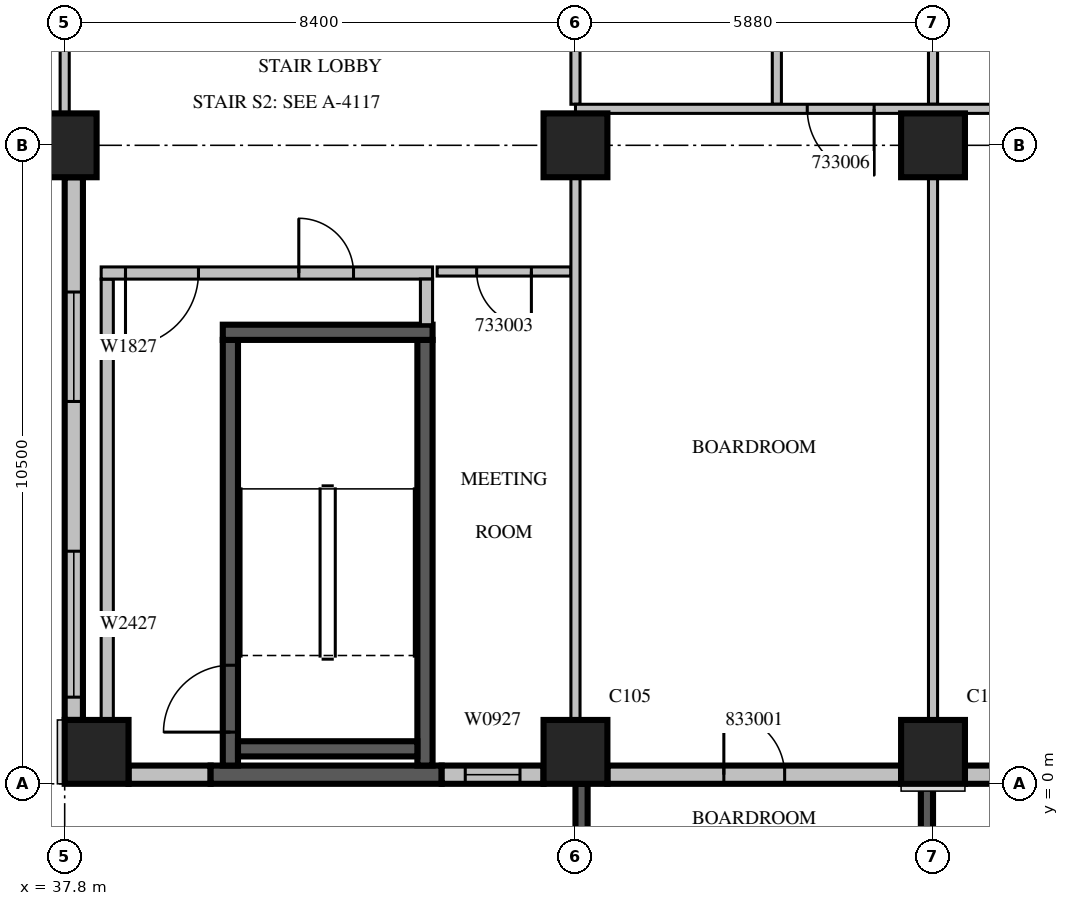
"""IFC4 building model, lengths in metres.
Left out: names, types, materials, properties, quantities, classifications, styles, units other than length and angle.
Written with IfcOpenShell. Run it as: python <this file> out.ifc"""

import sys

from ifc_helpers import new_model, si_unit, direction, frame, frame_2d, origin, origin_2d, place, context, subcontext, project, spatial, rectangle, extrude, source, transform, mapped, element, fill, save


model = new_model("IFC4")
c1 = context("Model", 3, precision=1e-05, world=origin(), true_north=direction((0.0, 1.0)))
c2 = subcontext(c1, "Body", "Model", "MODEL_VIEW")
j1 = project(units=[si_unit("LENGTHUNIT", "METRE"), si_unit("PLANEANGLEUNIT", "RADIAN")], contexts=[c1])
p1 = place(None, origin())
s1 = spatial("IfcSite", under=j1, at=p1, CompositionType="ELEMENT")
p2 = place(p1, origin())
s2 = spatial("IfcBuilding", under=s1, at=p2, CompositionType="ELEMENT")
p3 = place(p2, frame((0.0, 0.0, 149.7)))
s3 = spatial("IfcBuildingStorey", under=s2, at=p3, CompositionType="ELEMENT", Elevation=149.7)
m1 = source(origin(), c2, "Body", "SweptSolid", [
    extrude(rectangle(XDim=1.05, YDim=1.05, at=origin_2d()), origin(), (0.0, 0.0, 1.0), 4.2),
])
for number, where, z_axis, x_axis in (
    (1, (38.325, 0.525, 0.0), (0.0, 0.0, 1.0), (1.0, 0.0, 0.0)),
    (2, (46.2, 0.525, 0.0), (0.0, 0.0, 1.0), (1.0, 0.0, 0.0)),
    (3, (52.08, 0.525, 0.0), (0.0, 0.0, 1.0), (1.0, 0.0, 0.0)),
    (4, (37.8, 10.5, 0.0), (0.0, 0.0, 1.0), (1.0, 0.0, 0.0)),
    (5, (46.2, 10.5, 0.0), (0.0, 0.0, 1.0), (1.0, 0.0, 0.0)),
    (6, (52.08, 10.5, 0.0), (0.0, 0.0, 1.0), (1.0, 0.0, 0.0)),
):
    element("IfcColumn", number, at=place(p3, frame(where, z_axis=z_axis, x_axis=x_axis)), inside=s3, PredefinedType="COLUMN", context=c2, shape_type="MappedRepresentation", body=[
        mapped(m1, transform((0.0, 0.0, 0.0), scale=1.0)),
    ])
m2 = source(origin(), c2, "Body", "SweptSolid", [
    extrude(rectangle(XDim=3.9, YDim=0.2, at=frame_2d((1.95, 0.0))), origin(), (0.0, 0.0, 1.0), 3.8),
])
p4 = place(p3, frame((46.3, 0.0, 0.0), z_axis=(0.0, 0.0, 1.0), x_axis=(0.0, -1.0, 0.0)))
e7 = element("IfcWall", 7, at=p4, inside=s3, PredefinedType="SOLIDWALL", context=c2, shape_type="MappedRepresentation", body=[
    mapped(m2, transform((0.0, 0.0, 0.0), scale=1.0)),
])
m3 = source(origin(), c2, "Body", "SweptSolid", [
    extrude(rectangle(XDim=2.4, YDim=2.7, at=frame_2d((1.2, 1.35))), frame((0.0, 0.11, 0.0), z_axis=(0.0, -1.0, 0.0), x_axis=(1.0, 0.0, 0.0)), (0.0, 0.0, 1.0), 0.22),
])
p5 = place(p4, frame((0.75, 0.0, 0.6)))
e8 = element("IfcOpeningElement", 8, at=p5, cuts=e7, PredefinedType="OPENING", context=c2, shape_type="MappedRepresentation", body=[
    mapped(m3, transform((0.0, 0.0, 0.0), scale=1.0)),
])
p6 = place(p3, frame((51.98, 0.0, 0.0), z_axis=(0.0, 0.0, 1.0), x_axis=(0.0, -1.0, 0.0)))
e9 = element("IfcWall", 9, at=p6, inside=s3, PredefinedType="SOLIDWALL", context=c2, shape_type="MappedRepresentation", body=[
    mapped(m2, transform((0.0, 0.0, 0.0), scale=1.0)),
])
p7 = place(p6, frame((0.75, 0.0, 0.6)))
e10 = element("IfcOpeningElement", 10, at=p7, cuts=e9, PredefinedType="OPENING", context=c2, shape_type="MappedRepresentation", body=[
    mapped(m3, transform((0.0, 0.0, 0.0), scale=1.0)),
])
m4 = source(origin(), c2, "Body", "SweptSolid", [
    extrude(rectangle(XDim=8.925, YDim=0.3, at=frame_2d((4.463, 0.0))), origin(), (0.0, 0.0, 1.0), 3.8),
])
p8 = place(p3, frame((37.95, 9.975, 0.0), z_axis=(0.0, 0.0, 1.0), x_axis=(0.0, -1.0, 0.0)))
e11 = element("IfcWall", 11, at=p8, inside=s3, PredefinedType="STANDARD", context=c2, shape_type="MappedRepresentation", body=[
    mapped(m4, transform((0.0, 0.0, 0.0), scale=1.0)),
])
m5 = source(origin(), c2, "Body", "SweptSolid", [
    extrude(rectangle(XDim=1.8, YDim=2.7, at=frame_2d((0.9, 1.35))), frame((0.0, 0.16, 0.0), z_axis=(0.0, -1.0, 0.0), x_axis=(1.0, 0.0, 0.0)), (0.0, 0.0, 1.0), 0.32),
])
p9 = place(p8, frame((1.887, 0.0, 0.6)))
e12 = element("IfcOpeningElement", 12, at=p9, cuts=e11, PredefinedType="OPENING", context=c2, shape_type="MappedRepresentation", body=[
    mapped(m5, transform((0.0, 0.0, 0.0), scale=1.0)),
])
m6 = source(origin(), c2, "Body", "SweptSolid", [
    extrude(rectangle(XDim=2.4, YDim=2.7, at=frame_2d((1.2, 1.35))), frame((0.0, 0.16, 0.0), z_axis=(0.0, -1.0, 0.0), x_axis=(1.0, 0.0, 0.0)), (0.0, 0.0, 1.0), 0.32),
])
p10 = place(p8, frame((6.15, 0.0, 0.6)))
e13 = element("IfcOpeningElement", 13, at=p10, cuts=e11, PredefinedType="OPENING", context=c2, shape_type="MappedRepresentation", body=[
    mapped(m6, transform((0.0, 0.0, 0.0), scale=1.0)),
])
m7 = source(origin(), c2, "Body", "SweptSolid", [
    extrude(rectangle(XDim=1.35, YDim=0.3, at=frame_2d((0.675, 0.0))), origin(), (0.0, 0.0, 1.0), 3.8),
])
p11 = place(p3, frame((38.85, 0.15, 0.0), z_axis=(0.0, 0.0, 1.0), x_axis=(1.0, 0.0, 0.0)))
e14 = element("IfcWall", 14, at=p11, inside=s3, PredefinedType="STANDARD", context=c2, shape_type="MappedRepresentation", body=[
    mapped(m7, transform((0.0, 0.0, 0.0), scale=1.0)),
])
m8 = source(origin(), c2, "Body", "SweptSolid", [
    extrude(rectangle(XDim=3.8, YDim=0.3, at=frame_2d((1.9, 0.0))), origin(), (0.0, 0.0, 1.0), 3.8),
])
p12 = place(p3, frame((40.2, 0.15, 0.0), z_axis=(0.0, 0.0, 1.0), x_axis=(1.0, 0.0, 0.0)))
e15 = element("IfcWall", 15, at=p12, inside=s3, PredefinedType="SOLIDWALL", context=c2, shape_type="MappedRepresentation", body=[
    mapped(m8, transform((0.0, 0.0, 0.0), scale=1.0)),
])
m9 = source(origin(), c2, "Body", "SweptSolid", [
    extrude(rectangle(XDim=1.675, YDim=0.3, at=frame_2d((0.838, 0.0))), origin(), (0.0, 0.0, 1.0), 3.8),
])
p13 = place(p3, frame((44.0, 0.15, 0.0), z_axis=(0.0, 0.0, 1.0), x_axis=(1.0, 0.0, 0.0)))
e16 = element("IfcWall", 16, at=p13, inside=s3, PredefinedType="STANDARD", context=c2, shape_type="MappedRepresentation", body=[
    mapped(m9, transform((0.0, 0.0, 0.0), scale=1.0)),
])
m10 = source(origin(), c2, "Body", "SweptSolid", [
    extrude(rectangle(XDim=0.9, YDim=2.7, at=frame_2d((0.45, 1.35))), frame((0.0, 0.16, 0.0), z_axis=(0.0, -1.0, 0.0), x_axis=(1.0, 0.0, 0.0)), (0.0, 0.0, 1.0), 0.32),
])
p14 = place(p13, frame((0.388, 0.0, 0.6)))
e17 = element("IfcOpeningElement", 17, at=p14, cuts=e16, PredefinedType="OPENING", context=c2, shape_type="MappedRepresentation", body=[
    mapped(m10, transform((0.0, 0.0, 0.0), scale=1.0)),
])
m11 = source(origin(), c2, "Body", "SweptSolid", [
    extrude(rectangle(XDim=4.83, YDim=0.3, at=frame_2d((2.415, 0.0))), origin(), (0.0, 0.0, 1.0), 3.8),
])
p15 = place(p3, frame((46.725, 0.15, 0.0), z_axis=(0.0, 0.0, 1.0), x_axis=(1.0, 0.0, 0.0)))
e18 = element("IfcWall", 18, at=p15, inside=s3, PredefinedType="STANDARD", context=c2, shape_type="MappedRepresentation", body=[
    mapped(m11, transform((0.0, 0.0, 0.0), scale=1.0)),
])
m12 = source(origin(), c2, "Body", "SweptSolid", [
    extrude(rectangle(XDim=1.0, YDim=2.1, at=frame_2d((0.5, 1.05))), frame((0.0, 0.16, 0.0), z_axis=(0.0, -1.0, 0.0), x_axis=(1.0, 0.0, 0.0)), (0.0, 0.0, 1.0), 0.32),
])
p16 = place(p15, frame((1.915, 0.0, 0.0)))
e19 = element("IfcOpeningElement", 19, at=p16, cuts=e18, PredefinedType="OPENING", context=c2, shape_type="MappedRepresentation", body=[
    mapped(m12, transform((0.0, 0.0, 0.0), scale=1.0)),
])
p17 = place(p3, frame((52.605, 0.15, 0.0), z_axis=(0.0, 0.0, 1.0), x_axis=(1.0, 0.0, 0.0)))
e20 = element("IfcWall", 20, at=p17, inside=s3, PredefinedType="STANDARD", context=c2, shape_type="MappedRepresentation", body=[
    mapped(m11, transform((0.0, 0.0, 0.0), scale=1.0)),
])
m13 = source(origin(), c2, "Body", "SweptSolid", [
    extrude(rectangle(XDim=3.6, YDim=2.7, at=frame_2d((1.8, 1.35))), frame((0.0, 0.16, 0.0), z_axis=(0.0, -1.0, 0.0), x_axis=(1.0, 0.0, 0.0)), (0.0, 0.0, 1.0), 0.32),
])
p18 = place(p17, frame((0.615, 0.0, 0.6)))
e21 = element("IfcOpeningElement", 21, at=p18, cuts=e20, PredefinedType="OPENING", context=c2, shape_type="MappedRepresentation", body=[
    mapped(m13, transform((0.0, 0.0, 0.0), scale=1.0)),
])
m14 = source(origin(), c2, "Body", "SweptSolid", [
    extrude(rectangle(XDim=7.0, YDim=0.25, at=frame_2d((3.5, 0.0))), origin(), (0.0, 0.0, 1.0), 3.8),
])
p19 = place(p3, frame((40.525, 0.3, 0.0), z_axis=(0.0, 0.0, 1.0), x_axis=(0.0, 1.0, 0.0)))
e22 = element("IfcWall", 22, at=p19, inside=s3, PredefinedType="SOLIDWALL", context=c2, shape_type="MappedRepresentation", body=[
    mapped(m14, transform((0.0, 0.0, 0.0), scale=1.0)),
])
m15 = source(origin(), c2, "Body", "SweptSolid", [
    extrude(rectangle(XDim=1.1, YDim=2.1, at=frame_2d((0.55, 1.05))), frame((0.0, 0.135, 0.0), z_axis=(0.0, -1.0, 0.0), x_axis=(1.0, 0.0, 0.0)), (0.0, 0.0, 1.0), 0.27),
])
p20 = place(p19, frame((0.55, 0.0, 0.0)))
e23 = element("IfcOpeningElement", 23, at=p20, cuts=e22, PredefinedType="OPENING", context=c2, shape_type="MappedRepresentation", body=[
    mapped(m15, transform((0.0, 0.0, 0.0), scale=1.0)),
])
p21 = place(p3, frame((43.725, 0.3, 0.0), z_axis=(0.0, 0.0, 1.0), x_axis=(0.0, 1.0, 0.0)))
e24 = element("IfcWall", 24, at=p21, inside=s3, PredefinedType="SOLIDWALL", context=c2, shape_type="MappedRepresentation", body=[
    mapped(m14, transform((0.0, 0.0, 0.0), scale=1.0)),
])
m16 = source(origin(), c2, "Body", "SweptSolid", [
    extrude(rectangle(XDim=3.45, YDim=0.25, at=frame_2d((1.725, 0.0))), origin(), (0.0, 0.0, 1.0), 3.8),
])
p22 = place(p3, frame((40.4, 7.425, 0.0), z_axis=(0.0, 0.0, 1.0), x_axis=(1.0, 0.0, 0.0)))
e25 = element("IfcWall", 25, at=p22, inside=s3, PredefinedType="SOLIDWALL", context=c2, shape_type="MappedRepresentation", body=[
    mapped(m16, transform((0.0, 0.0, 0.0), scale=1.0)),
])
m17 = source(origin(), c2, "Body", "SweptSolid", [
    extrude(rectangle(XDim=2.95, YDim=0.25, at=frame_2d((1.475, 0.0))), origin(), (0.0, 0.0, 1.0), 3.8),
])
p23 = place(p3, frame((40.65, 0.575, 0.0), z_axis=(0.0, 0.0, 1.0), x_axis=(1.0, 0.0, 0.0)))
e26 = element("IfcWall", 26, at=p23, inside=s3, PredefinedType="SOLIDWALL", context=c2, shape_type="MappedRepresentation", body=[
    mapped(m17, transform((0.0, 0.0, 0.0), scale=1.0)),
])
m18 = source(origin(), c2, "Body", "SweptSolid", [
    extrude(rectangle(XDim=8.0, YDim=0.2, at=frame_2d((4.0, 0.0))), origin(), (0.0, 0.0, 1.0), 3.8),
])
p24 = place(p3, frame((38.5, 0.3, 0.0), z_axis=(0.0, 0.0, 1.0), x_axis=(0.0, 1.0, 0.0)))
e27 = element("IfcWall", 27, at=p24, inside=s3, PredefinedType="PARTITIONING", context=c2, shape_type="MappedRepresentation", body=[
    mapped(m18, transform((0.0, 0.0, 0.0), scale=1.0)),
])
m19 = source(origin(), c2, "Body", "SweptSolid", [
    extrude(rectangle(XDim=5.45, YDim=0.2, at=frame_2d((2.725, 0.0))), origin(), (0.0, 0.0, 1.0), 3.8),
])
p25 = place(p3, frame((38.4, 8.4, 0.0), z_axis=(0.0, 0.0, 1.0), x_axis=(1.0, 0.0, 0.0)))
e28 = element("IfcWall", 28, at=p25, inside=s3, PredefinedType="PARTITIONING", context=c2, shape_type="MappedRepresentation", body=[
    mapped(m19, transform((0.0, 0.0, 0.0), scale=1.0)),
])
m20 = source(origin(), c2, "Body", "SweptSolid", [
    extrude(rectangle(XDim=1.2, YDim=2.1, at=frame_2d((0.6, 1.05))), frame((0.0, 0.11, 0.0), z_axis=(0.0, -1.0, 0.0), x_axis=(1.0, 0.0, 0.0)), (0.0, 0.0, 1.0), 0.22),
])
p26 = place(p25, frame((0.4, 0.0, 0.0)))
e29 = element("IfcOpeningElement", 29, at=p26, cuts=e28, PredefinedType="OPENING", context=c2, shape_type="MappedRepresentation", body=[
    mapped(m20, transform((0.0, 0.0, 0.0), scale=1.0)),
])
m21 = source(origin(), c2, "Body", "SweptSolid", [
    extrude(rectangle(XDim=0.9, YDim=2.1, at=frame_2d((0.45, 1.05))), frame((0.0, 0.11, 0.0), z_axis=(0.0, -1.0, 0.0), x_axis=(1.0, 0.0, 0.0)), (0.0, 0.0, 1.0), 0.22),
])
p27 = place(p25, frame((3.25, 0.0, 0.0)))
e30 = element("IfcOpeningElement", 30, at=p27, cuts=e28, PredefinedType="OPENING", context=c2, shape_type="MappedRepresentation", body=[
    mapped(m21, transform((0.0, 0.0, 0.0), scale=1.0)),
])
m22 = source(origin(), c2, "Body", "SweptSolid", [
    extrude(rectangle(XDim=0.75, YDim=0.2, at=frame_2d((0.375, 0.0))), origin(), (0.0, 0.0, 1.0), 3.8),
])
p28 = place(p3, frame((43.75, 7.55, 0.0), z_axis=(0.0, 0.0, 1.0), x_axis=(0.0, 1.0, 0.0)))
e31 = element("IfcWall", 31, at=p28, inside=s3, PredefinedType="PARTITIONING", context=c2, shape_type="MappedRepresentation", body=[
    mapped(m22, transform((0.0, 0.0, 0.0), scale=1.0)),
])
m23 = source(origin(), c2, "Body", "SweptSolid", [
    extrude(rectangle(XDim=2.2, YDim=0.15, at=frame_2d((1.1, 0.0))), origin(), (0.0, 0.0, 1.0), 3.8),
])
p29 = place(p3, frame((46.125, 8.425, 0.0), z_axis=(0.0, 0.0, 1.0), x_axis=(-1.0, 0.0, 0.0)))
e32 = element("IfcWall", 32, at=p29, inside=s3, PredefinedType="PARTITIONING", context=c2, shape_type="MappedRepresentation", body=[
    mapped(m23, transform((0.0, 0.0, 0.0), scale=1.0)),
])
m24 = source(origin(), c2, "Body", "SweptSolid", [
    extrude(rectangle(XDim=0.9, YDim=2.1, at=frame_2d((0.45, 1.05))), frame((0.0, 0.085, 0.0), z_axis=(0.0, -1.0, 0.0), x_axis=(1.0, 0.0, 0.0)), (0.0, 0.0, 1.0), 0.17),
])
p30 = place(p29, frame((0.65, 0.0, 0.0)))
e33 = element("IfcOpeningElement", 33, at=p30, cuts=e32, PredefinedType="OPENING", context=c2, shape_type="MappedRepresentation", body=[
    mapped(m24, transform((0.0, 0.0, 0.0), scale=1.0)),
])
m25 = source(origin(), c2, "Body", "SweptSolid", [
    extrude(rectangle(XDim=3.976, YDim=0.15, at=frame_2d((1.988, 0.0))), origin(), (0.0, 0.0, 1.0), 3.8),
])
p31 = place(p3, frame((37.8, 11.024, 0.0), z_axis=(0.0, 0.0, 1.0), x_axis=(0.0, 1.0, 0.0)))
e34 = element("IfcWall", 34, at=p31, inside=s3, PredefinedType="PARTITIONING", context=c2, shape_type="MappedRepresentation", body=[
    mapped(m25, transform((0.0, 0.0, 0.0), scale=1.0)),
])
m26 = source(origin(), c2, "Body", "SweptSolid", [
    extrude(rectangle(XDim=3.825, YDim=0.15, at=frame_2d((1.913, 0.0))), origin(), (0.0, 0.0, 1.0), 3.8),
])
p32 = place(p3, frame((49.512, 11.175, 0.0), z_axis=(0.0, 0.0, 1.0), x_axis=(0.0, 1.0, 0.0)))
e35 = element("IfcWall", 35, at=p32, inside=s3, PredefinedType="PARTITIONING", context=c2, shape_type="MappedRepresentation", body=[
    mapped(m26, transform((0.0, 0.0, 0.0), scale=1.0)),
])
m27 = source(origin(), c2, "Body", "SweptSolid", [
    extrude(rectangle(XDim=8.927, YDim=0.15, at=frame_2d((4.463, 0.0))), origin(), (0.0, 0.0, 1.0), 3.8),
])
p33 = place(p3, frame((46.2, 1.049, 0.0), z_axis=(0.0, 0.0, 1.0), x_axis=(0.0, 1.0, 0.0)))
e36 = element("IfcWall", 36, at=p33, inside=s3, PredefinedType="PARTITIONING", context=c2, shape_type="MappedRepresentation", body=[
    mapped(m27, transform((0.0, 0.0, 0.0), scale=1.0)),
])
p34 = place(p3, frame((46.2, 11.175, 0.0), z_axis=(0.0, 0.0, 1.0), x_axis=(0.0, 1.0, 0.0)))
e37 = element("IfcWall", 37, at=p34, inside=s3, PredefinedType="PARTITIONING", context=c2, shape_type="MappedRepresentation", body=[
    mapped(m26, transform((0.0, 0.0, 0.0), scale=1.0)),
])
p35 = place(p3, frame((52.08, 1.049, 0.0), z_axis=(0.0, 0.0, 1.0), x_axis=(0.0, 1.0, 0.0)))
e38 = element("IfcWall", 38, at=p35, inside=s3, PredefinedType="PARTITIONING", context=c2, shape_type="MappedRepresentation", body=[
    mapped(m27, transform((0.0, 0.0, 0.0), scale=1.0)),
])
p36 = place(p3, frame((52.08, 11.175, 0.0), z_axis=(0.0, 0.0, 1.0), x_axis=(0.0, 1.0, 0.0)))
e39 = element("IfcWall", 39, at=p36, inside=s3, PredefinedType="PARTITIONING", context=c2, shape_type="MappedRepresentation", body=[
    mapped(m26, transform((0.0, 0.0, 0.0), scale=1.0)),
])
m28 = source(origin(), c2, "Body", "SweptSolid", [
    extrude(rectangle(XDim=24.9, YDim=0.15, at=frame_2d((12.45, 0.0))), origin(), (0.0, 0.0, 1.0), 3.8),
])
p37 = place(p3, frame((71.1, 11.1, 0.0), z_axis=(0.0, 0.0, 1.0), x_axis=(-1.0, 0.0, 0.0)))
e40 = element("IfcWall", 40, at=p37, inside=s3, PredefinedType="PARTITIONING", context=c2, shape_type="MappedRepresentation", body=[
    mapped(m28, transform((0.0, 0.0, 0.0), scale=1.0)),
])
m29 = source(origin(), c2, "Body", "SweptSolid", [
    extrude(rectangle(XDim=1.1, YDim=2.1, at=frame_2d((0.55, 1.05))), frame((0.0, 0.085, 0.0), z_axis=(0.0, -1.0, 0.0), x_axis=(1.0, 0.0, 0.0)), (0.0, 0.0, 1.0), 0.17),
])
p38 = place(p37, frame((19.988, 0.0, 0.0)))
e41 = element("IfcOpeningElement", 41, at=p38, cuts=e40, PredefinedType="OPENING", context=c2, shape_type="MappedRepresentation", body=[
    mapped(m29, transform((0.0, 0.0, 0.0), scale=1.0)),
])
p39 = place(p37, frame((15.63, 0.0, 0.0)))
e42 = element("IfcOpeningElement", 42, at=p39, cuts=e40, PredefinedType="OPENING", context=c2, shape_type="MappedRepresentation", body=[
    mapped(m24, transform((0.0, 0.0, 0.0), scale=1.0)),
])
p40 = place(p37, frame((9.75, 0.0, 0.0)))
e43 = element("IfcOpeningElement", 43, at=p40, cuts=e40, PredefinedType="OPENING", context=c2, shape_type="MappedRepresentation", body=[
    mapped(m24, transform((0.0, 0.0, 0.0), scale=1.0)),
])
p41 = place(p37, frame((2.205, 0.0, 0.0)))
e44 = element("IfcOpeningElement", 44, at=p41, cuts=e40, PredefinedType="OPENING", context=c2, shape_type="MappedRepresentation", body=[
    mapped(m24, transform((0.0, 0.0, 0.0), scale=1.0)),
])
m30 = source(origin(), c2, "Body", "SweptSolid", [
    extrude(rectangle(XDim=1.8, YDim=2.7, at=frame_2d((0.9, 1.35))), frame((0.0, 0.03, 0.0), z_axis=(0.0, -1.0, 0.0), x_axis=(1.0, 0.0, 0.0)), (0.0, 0.0, 1.0), 0.06),
])
p42 = place(p9, origin())
e45 = element("IfcWindow", 45, at=p42, inside=s3, PartitioningType="SINGLE_PANEL", PredefinedType="WINDOW", context=c2, shape_type="MappedRepresentation", body=[
    mapped(m30, transform((0.0, 0.0, 0.0), scale=1.0)),
])
fill(e12, e45)
m31 = source(origin(), c2, "Body", "SweptSolid", [
    extrude(rectangle(XDim=2.4, YDim=2.7, at=frame_2d((1.2, 1.35))), frame((0.0, 0.03, 0.0), z_axis=(0.0, -1.0, 0.0), x_axis=(1.0, 0.0, 0.0)), (0.0, 0.0, 1.0), 0.06),
])
p43 = place(p10, origin())
e46 = element("IfcWindow", 46, at=p43, inside=s3, PartitioningType="SINGLE_PANEL", PredefinedType="WINDOW", context=c2, shape_type="MappedRepresentation", body=[
    mapped(m31, transform((0.0, 0.0, 0.0), scale=1.0)),
])
fill(e13, e46)
m32 = source(origin(), c2, "Body", "SweptSolid", [
    extrude(rectangle(XDim=0.9, YDim=2.7, at=frame_2d((0.45, 1.35))), frame((0.0, 0.03, 0.0), z_axis=(0.0, -1.0, 0.0), x_axis=(1.0, 0.0, 0.0)), (0.0, 0.0, 1.0), 0.06),
])
p44 = place(p14, origin())
e47 = element("IfcWindow", 47, at=p44, inside=s3, PartitioningType="SINGLE_PANEL", PredefinedType="WINDOW", context=c2, shape_type="MappedRepresentation", body=[
    mapped(m32, transform((0.0, 0.0, 0.0), scale=1.0)),
])
fill(e17, e47)
m33 = source(origin(), c2, "Body", "SweptSolid", [
    extrude(rectangle(XDim=1.1, YDim=2.1, at=frame_2d((0.55, 1.05))), frame((0.0, 0.025, 0.0), z_axis=(0.0, -1.0, 0.0), x_axis=(1.0, 0.0, 0.0)), (0.0, 0.0, 1.0), 0.05),
])
p45 = place(p20, origin())
e48 = element("IfcDoor", 48, at=p45, inside=s3, OperationType="SINGLE_SWING_LEFT", PredefinedType="DOOR", context=c2, shape_type="MappedRepresentation", body=[
    mapped(m33, transform((0.0, 0.0, 0.0), scale=1.0)),
])
fill(e23, e48)
m34 = source(origin(), c2, "Body", "SweptSolid", [
    extrude(rectangle(XDim=1.2, YDim=2.1, at=frame_2d((0.6, 1.05))), frame((0.0, 0.025, 0.0), z_axis=(0.0, -1.0, 0.0), x_axis=(1.0, 0.0, 0.0)), (0.0, 0.0, 1.0), 0.05),
])
p46 = place(p26, origin())
e49 = element("IfcDoor", 49, at=p46, inside=s3, OperationType="SINGLE_SWING_RIGHT", PredefinedType="DOOR", context=c2, shape_type="MappedRepresentation", body=[
    mapped(m34, transform((0.0, 0.0, 0.0), scale=1.0)),
])
fill(e29, e49)
m35 = source(origin(), c2, "Body", "SweptSolid", [
    extrude(rectangle(XDim=0.9, YDim=2.1, at=frame_2d((0.45, 1.05))), frame((0.0, 0.025, 0.0), z_axis=(0.0, -1.0, 0.0), x_axis=(1.0, 0.0, 0.0)), (0.0, 0.0, 1.0), 0.05),
])
p47 = place(p27, origin())
e50 = element("IfcDoor", 50, at=p47, inside=s3, OperationType="SINGLE_SWING_LEFT", PredefinedType="DOOR", context=c2, shape_type="MappedRepresentation", body=[
    mapped(m35, transform((0.0, 0.0, 0.0), scale=1.0)),
])
fill(e30, e50)
p48 = place(p30, origin())
e51 = element("IfcDoor", 51, at=p48, inside=s3, OperationType="SINGLE_SWING_LEFT", PredefinedType="DOOR", context=c2, shape_type="MappedRepresentation", body=[
    mapped(m35, transform((0.0, 0.0, 0.0), scale=1.0)),
])
fill(e33, e51)
p49 = place(p38, origin())
e52 = element("IfcDoor", 52, at=p49, inside=s3, OperationType="SINGLE_SWING_LEFT", PredefinedType="DOOR", context=c2, shape_type="MappedRepresentation", body=[
    mapped(m33, transform((0.0, 0.0, 0.0), scale=1.0)),
])
fill(e41, e52)
m36 = source(origin(), c2, "Body", "SweptSolid", [
    extrude(rectangle(XDim=1.0, YDim=2.1, at=frame_2d((0.5, 1.05))), frame((0.0, 0.025, 0.0), z_axis=(0.0, -1.0, 0.0), x_axis=(1.0, 0.0, 0.0)), (0.0, 0.0, 1.0), 0.05),
])
p50 = place(p16, origin())
e53 = element("IfcDoor", 53, at=p50, inside=s3, OperationType="SINGLE_SWING_LEFT", PredefinedType="DOOR", context=c2, shape_type="MappedRepresentation", body=[
    mapped(m36, transform((0.0, 0.0, 0.0), scale=1.0)),
])
fill(e19, e53)
save(model, sys.argv[1])
